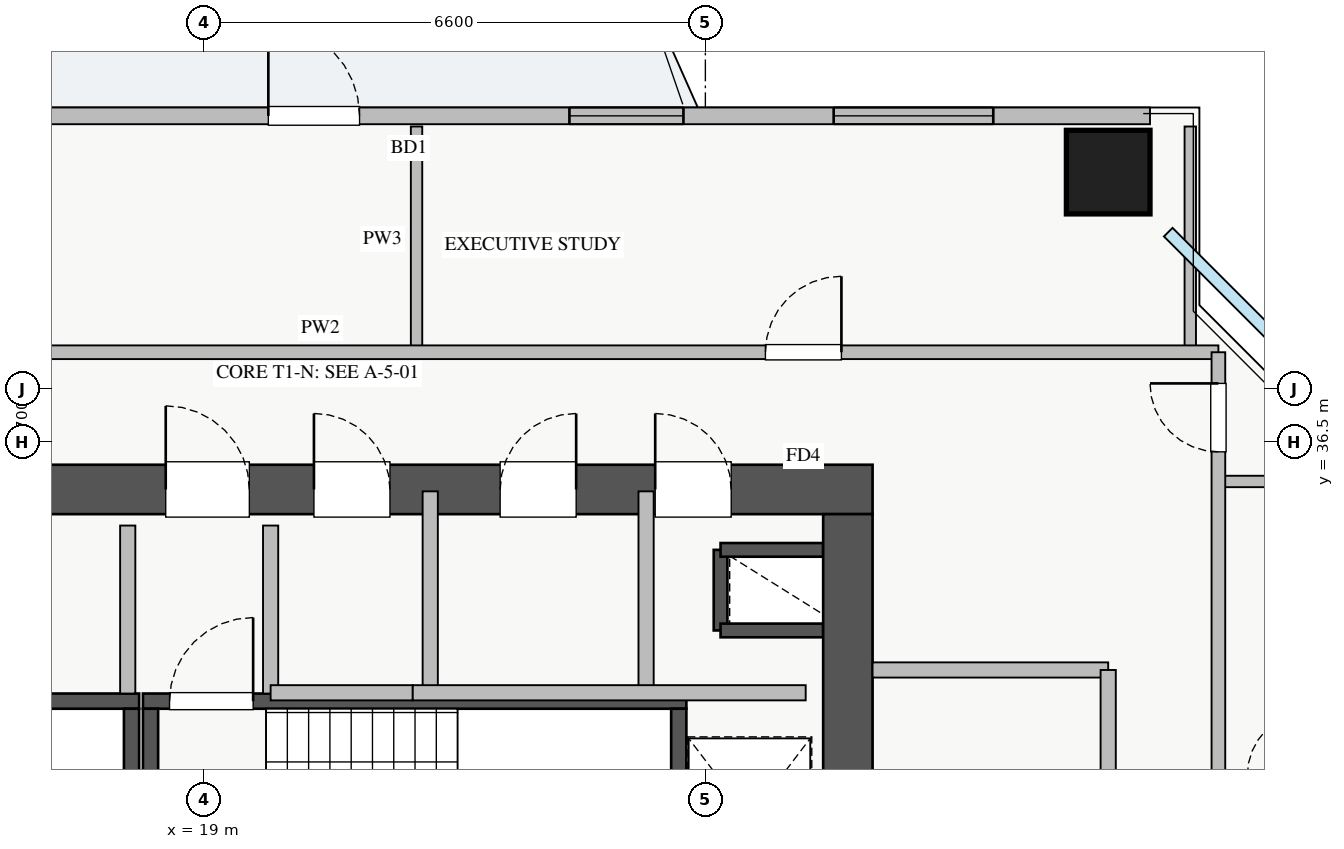
"""IFC4 building model, lengths in metres.
Left out: names, types, materials, properties, quantities, classifications, styles, units other than length and angle.
Written with IfcOpenShell. Run it as: python <this file> out.ifc"""

import sys

from ifc_helpers import new_model, si_unit, direction, frame, frame_2d, origin, origin_2d, place, context, subcontext, project, spatial, rectangle, extrude, source, transform, mapped, element, fill, save


model = new_model("IFC4")
c1 = context("Model", 3, precision=1e-05, world=origin(), true_north=direction((0.0, 1.0)))
c2 = subcontext(c1, "Body", "Model", "MODEL_VIEW")
j1 = project(units=[si_unit("LENGTHUNIT", "METRE"), si_unit("PLANEANGLEUNIT", "RADIAN")], contexts=[c1])
p1 = place(None, origin())
s1 = spatial("IfcSite", under=j1, at=p1, CompositionType="ELEMENT")
p2 = place(p1, origin())
s2 = spatial("IfcBuilding", under=s1, at=p2, CompositionType="ELEMENT")
p3 = place(p2, frame((0.0, 0.0, 129.5)))
s3 = spatial("IfcBuildingStorey", under=s2, at=p3, CompositionType="ELEMENT", Elevation=129.5)
p4 = place(p3, frame((25.8, 34.02, 0.0), z_axis=(0.0, 0.0, 1.0), x_axis=(0.0, 1.0, 0.0)))
e1 = element("IfcWall", 1, at=p4, inside=s3, PredefinedType="SHEAR", context=c2, shape_type="SweptSolid", body=[
    extrude(rectangle(XDim=1.06, YDim=0.18, at=frame_2d((0.53, 0.0))), origin(), (0.0, 0.0, 1.0), 3.07),
])
for number, where, z_axis, x_axis in (
    (2, (25.8, 35.08, 0.0), (0.0, 0.0, 1.0), (1.0, 0.0, 0.0)),
    (3, (25.8, 34.02, 0.0), (0.0, 0.0, 1.0), (1.0, 0.0, 0.0)),
):
    element("IfcWall", number, at=place(p3, frame(where, z_axis=z_axis, x_axis=x_axis)), inside=s3, PredefinedType="SHEAR", context=c2, shape_type="SweptSolid", body=[
        extrude(rectangle(XDim=1.35, YDim=0.18, at=frame_2d((0.675, 0.0))), origin(), (0.0, 0.0, 1.0), 3.07),
    ])
p5 = place(p3, frame((10.85, 33.09, 0.0), z_axis=(0.0, 0.0, 1.0), x_axis=(1.0, 0.0, 0.0)))
e4 = element("IfcWall", 4, at=p5, inside=s3, PredefinedType="SHEAR", context=c2, shape_type="SweptSolid", body=[
    extrude(rectangle(XDim=7.3, YDim=0.2, at=frame_2d((3.65, 0.0))), origin(), (0.0, 0.0, 1.0), 3.25),
])
p6 = place(p5, frame((0.35, 0.0, 0.0)))
e5 = element("IfcOpeningElement", 5, at=p6, cuts=e4, PredefinedType="OPENING", context=c2, shape_type="SweptSolid", body=[
    extrude(rectangle(XDim=1.1, YDim=2.05, at=frame_2d((0.55, 1.025))), frame((0.0, 0.11, 0.0), z_axis=(0.0, -1.0, 0.0), x_axis=(1.0, 0.0, 0.0)), (0.0, 0.0, 1.0), 0.22),
])
p7 = place(p3, frame((18.05, 30.05, 0.0), z_axis=(0.0, 0.0, 1.0), x_axis=(0.0, 1.0, 0.0)))
e6 = element("IfcWall", 6, at=p7, inside=s3, PredefinedType="SHEAR", context=c2, shape_type="SweptSolid", body=[
    extrude(rectangle(XDim=2.94, YDim=0.2, at=frame_2d((1.47, 0.0))), origin(), (0.0, 0.0, 1.0), 3.25),
])
p8 = place(p3, frame((18.2, 33.09, 0.0), z_axis=(0.0, 0.0, 1.0), x_axis=(1.0, 0.0, 0.0)))
e7 = element("IfcWall", 7, at=p8, inside=s3, PredefinedType="SHEAR", context=c2, shape_type="SweptSolid", body=[
    extrude(rectangle(XDim=7.15, YDim=0.2, at=frame_2d((3.575, 0.0))), origin(), (0.0, 0.0, 1.0), 3.25),
])
p9 = place(p8, frame((0.35, 0.0, 0.0)))
e8 = element("IfcOpeningElement", 8, at=p9, cuts=e7, PredefinedType="OPENING", context=c2, shape_type="SweptSolid", body=[
    extrude(rectangle(XDim=1.1, YDim=2.05, at=frame_2d((0.55, 1.025))), frame((0.0, 0.11, 0.0), z_axis=(0.0, -1.0, 0.0), x_axis=(1.0, 0.0, 0.0)), (0.0, 0.0, 1.0), 0.22),
])
for number, where, z_axis, x_axis in (
    (9, (18.3, 30.05, 0.0), (0.0, 0.0, 1.0), (0.0, 1.0, 0.0)),
    (10, (25.25, 30.05, 0.0), (0.0, 0.0, 1.0), (0.0, 1.0, 0.0)),
):
    element("IfcWall", number, at=place(p3, frame(where, z_axis=z_axis, x_axis=x_axis)), inside=s3, PredefinedType="SHEAR", context=c2, shape_type="SweptSolid", body=[
        extrude(rectangle(XDim=2.94, YDim=0.2, at=frame_2d((1.47, 0.0))), origin(), (0.0, 0.0, 1.0), 3.25),
    ])
p10 = place(p3, frame((10.2, 35.875, 0.0), z_axis=(0.0, 0.0, 1.0), x_axis=(1.0, 0.0, 0.0)))
e11 = element("IfcWall", 11, at=p10, inside=s3, PredefinedType="SHEAR", context=c2, shape_type="SweptSolid", body=[
    extrude(rectangle(XDim=17.6, YDim=0.65, at=frame_2d((8.8, 0.0))), origin(), (0.0, 0.0, 1.0), 3.25),
])
p11 = place(p10, frame((1.15, 0.0, 0.0)))
e12 = element("IfcOpeningElement", 12, at=p11, cuts=e11, PredefinedType="OPENING", context=c2, shape_type="SweptSolid", body=[
    extrude(rectangle(XDim=1.1, YDim=2.05, at=frame_2d((0.55, 1.025))), frame((0.0, 0.335, 0.0), z_axis=(0.0, -1.0, 0.0), x_axis=(1.0, 0.0, 0.0)), (0.0, 0.0, 1.0), 0.67),
])
p12 = place(p10, frame((8.3, 0.0, 0.0)))
e13 = element("IfcOpeningElement", 13, at=p12, cuts=e11, PredefinedType="OPENING", context=c2, shape_type="SweptSolid", body=[
    extrude(rectangle(XDim=1.1, YDim=2.05, at=frame_2d((0.55, 1.025))), frame((0.0, 0.335, 0.0), z_axis=(0.0, -1.0, 0.0), x_axis=(1.0, 0.0, 0.0)), (0.0, 0.0, 1.0), 0.67),
])
p13 = place(p10, frame((4.9, 0.0, 0.0)))
e14 = element("IfcOpeningElement", 14, at=p13, cuts=e11, PredefinedType="OPENING", context=c2, shape_type="SweptSolid", body=[
    extrude(rectangle(XDim=1.1, YDim=2.05, at=frame_2d((0.55, 1.025))), frame((0.0, 0.335, 0.0), z_axis=(0.0, -1.0, 0.0), x_axis=(1.0, 0.0, 0.0)), (0.0, 0.0, 1.0), 0.67),
])
p14 = place(p10, frame((14.74, 0.0, 0.0)))
e15 = element("IfcOpeningElement", 15, at=p14, cuts=e11, PredefinedType="OPENING", context=c2, shape_type="SweptSolid", body=[
    extrude(rectangle(XDim=1.0, YDim=2.05, at=frame_2d((0.5, 1.025))), frame((0.0, 0.335, 0.0), z_axis=(0.0, -1.0, 0.0), x_axis=(1.0, 0.0, 0.0)), (0.0, 0.0, 1.0), 0.67),
])
p15 = place(p10, frame((10.25, 0.0, 0.0)))
e16 = element("IfcOpeningElement", 16, at=p15, cuts=e11, PredefinedType="OPENING", context=c2, shape_type="SweptSolid", body=[
    extrude(rectangle(XDim=1.0, YDim=2.05, at=frame_2d((0.5, 1.025))), frame((0.0, 0.335, 0.0), z_axis=(0.0, -1.0, 0.0), x_axis=(1.0, 0.0, 0.0)), (0.0, 0.0, 1.0), 0.67),
])
p16 = place(p10, frame((12.7, 0.0, 0.0)))
e17 = element("IfcOpeningElement", 17, at=p16, cuts=e11, PredefinedType="OPENING", context=c2, shape_type="SweptSolid", body=[
    extrude(rectangle(XDim=1.0, YDim=2.05, at=frame_2d((0.5, 1.025))), frame((0.0, 0.335, 0.0), z_axis=(0.0, -1.0, 0.0), x_axis=(1.0, 0.0, 0.0)), (0.0, 0.0, 1.0), 0.67),
])
p17 = place(p3, frame((27.475, 29.65, 0.0), z_axis=(0.0, 0.0, 1.0), x_axis=(0.0, 1.0, 0.0)))
e18 = element("IfcWall", 18, at=p17, inside=s3, PredefinedType="SHEAR", context=c2, shape_type="SweptSolid", body=[
    extrude(rectangle(XDim=5.9, YDim=0.65, at=frame_2d((2.95, 0.0))), origin(), (0.0, 0.0, 1.0), 3.25),
])
p18 = place(p17, frame((1.1, 0.0, 0.0)))
e19 = element("IfcOpeningElement", 19, at=p18, cuts=e18, PredefinedType="OPENING", context=c2, shape_type="SweptSolid", body=[
    extrude(rectangle(XDim=1.3, YDim=2.05, at=frame_2d((0.65, 1.025))), frame((0.0, 0.335, 0.0), z_axis=(0.0, -1.0, 0.0), x_axis=(1.0, 0.0, 0.0)), (0.0, 0.0, 1.0), 0.67),
])
m1 = source(origin(), c2, "Body", "SweptSolid", [
    extrude(rectangle(XDim=1.1, YDim=1.1, at=origin_2d()), origin(), (0.0, 0.0, 1.0), 3.25),
])
p19 = place(p3, frame((30.9, 40.05, 0.0), z_axis=(0.0, 0.0, 1.0), x_axis=(1.0, 0.0, 0.0)))
e20 = element("IfcColumn", 20, at=p19, inside=s3, PredefinedType="COLUMN", context=c2, shape_type="MappedRepresentation", body=[
    mapped(m1, transform((0.0, 0.0, 0.0), x_axis=(1.0, 0.0, 0.0), y_axis=(0.0, 1.0, 0.0), z_axis=(0.0, 0.0, 1.0), scale=1.0)),
])
p20 = place(p3, frame((6.55, 40.79, 0.0), z_axis=(0.0, 0.0, 1.0), x_axis=(1.0, 0.0, 0.0)))
e21 = element("IfcWall", 21, at=p20, inside=s3, PredefinedType="STANDARD", context=c2, shape_type="SweptSolid", body=[
    extrude(rectangle(XDim=24.9, YDim=0.22, at=frame_2d((12.45, 0.0))), origin(), (0.0, 0.0, 1.0), 2.61),
])
p21 = place(p20, frame((13.3, 0.0, 0.0)))
e22 = element("IfcOpeningElement", 22, at=p21, cuts=e21, PredefinedType="OPENING", context=c2, shape_type="SweptSolid", body=[
    extrude(rectangle(XDim=1.2, YDim=2.1, at=frame_2d((0.6, 1.05))), frame((0.0, 0.12, 0.0), z_axis=(0.0, -1.0, 0.0), x_axis=(1.0, 0.0, 0.0)), (0.0, 0.0, 1.0), 0.24),
])
p22 = place(p20, frame((0.343, 0.0, 0.9)))
e23 = element("IfcOpeningElement", 23, at=p22, cuts=e21, PredefinedType="OPENING", context=c2, shape_type="SweptSolid", body=[
    extrude(rectangle(XDim=1.5, YDim=1.5, at=frame_2d((0.75, 0.75))), frame((0.0, 0.12, 0.0), z_axis=(0.0, -1.0, 0.0), x_axis=(1.0, 0.0, 0.0)), (0.0, 0.0, 1.0), 0.24),
])
p23 = place(p20, frame((8.438, 0.0, 0.9)))
e24 = element("IfcOpeningElement", 24, at=p23, cuts=e21, PredefinedType="OPENING", context=c2, shape_type="SweptSolid", body=[
    extrude(rectangle(XDim=1.8, YDim=1.45, at=frame_2d((0.9, 0.725))), frame((0.0, 0.12, 0.0), z_axis=(0.0, -1.0, 0.0), x_axis=(1.0, 0.0, 0.0)), (0.0, 0.0, 1.0), 0.24),
])
p24 = place(p20, frame((17.261, 0.0, 0.9)))
e25 = element("IfcOpeningElement", 25, at=p24, cuts=e21, PredefinedType="OPENING", context=c2, shape_type="SweptSolid", body=[
    extrude(rectangle(XDim=1.5, YDim=1.5, at=frame_2d((0.75, 0.75))), frame((0.0, 0.12, 0.0), z_axis=(0.0, -1.0, 0.0), x_axis=(1.0, 0.0, 0.0)), (0.0, 0.0, 1.0), 0.24),
])
p25 = place(p20, frame((20.738, 0.0, 0.9)))
e26 = element("IfcOpeningElement", 26, at=p25, cuts=e21, PredefinedType="OPENING", context=c2, shape_type="SweptSolid", body=[
    extrude(rectangle(XDim=2.1, YDim=1.48, at=frame_2d((1.05, 0.74))), frame((0.0, 0.12, 0.0), z_axis=(0.0, -1.0, 0.0), x_axis=(1.0, 0.0, 0.0)), (0.0, 0.0, 1.0), 0.24),
])
p26 = place(p20, frame((4.122, 0.0, 0.9)))
e27 = element("IfcOpeningElement", 27, at=p26, cuts=e21, PredefinedType="OPENING", context=c2, shape_type="SweptSolid", body=[
    extrude(rectangle(XDim=2.4, YDim=1.5, at=frame_2d((1.2, 0.75))), frame((0.0, 0.12, 0.0), z_axis=(0.0, -1.0, 0.0), x_axis=(1.0, 0.0, 0.0)), (0.0, 0.0, 1.0), 0.24),
])
p27 = place(p3, frame((27.8, 33.5, 0.0), z_axis=(0.0, 0.0, 1.0), x_axis=(1.0, 0.0, 0.0)))
e28 = element("IfcWall", 28, at=p27, inside=s3, PredefinedType="PARTITIONING", context=c2, shape_type="SweptSolid", body=[
    extrude(rectangle(XDim=3.1, YDim=0.2, at=frame_2d((1.55, 0.0))), origin(), (0.0, 0.0, 1.0), 3.07),
])
p28 = place(p3, frame((30.9, 29.6, 0.0), z_axis=(0.0, 0.0, 1.0), x_axis=(0.0, 1.0, 0.0)))
e29 = element("IfcWall", 29, at=p28, inside=s3, PredefinedType="PARTITIONING", context=c2, shape_type="SweptSolid", body=[
    extrude(rectangle(XDim=3.9, YDim=0.2, at=frame_2d((1.95, 0.0))), origin(), (0.0, 0.0, 1.0), 3.07),
])
p29 = place(p28, frame((1.4, 0.0, 0.0)))
e30 = element("IfcOpeningElement", 30, at=p29, cuts=e29, PredefinedType="OPENING", context=c2, shape_type="SweptSolid", body=[
    extrude(rectangle(XDim=1.1, YDim=2.05, at=frame_2d((0.55, 1.025))), frame((0.0, 0.11, 0.0), z_axis=(0.0, -1.0, 0.0), x_axis=(1.0, 0.0, 0.0)), (0.0, 0.0, 1.0), 0.22),
])
for number, where, z_axis, x_axis in (
    (31, (18.0, 33.19, 0.0), (0.0, 0.0, 1.0), (0.0, 1.0, 0.0)),
    (32, (19.88, 33.19, 0.0), (0.0, 0.0, 1.0), (0.0, 1.0, 0.0)),
):
    element("IfcWall", number, at=place(p3, frame(where, z_axis=z_axis, x_axis=x_axis)), inside=s3, PredefinedType="PARTITIONING", context=c2, shape_type="SweptSolid", body=[
        extrude(rectangle(XDim=2.21, YDim=0.2, at=frame_2d((1.105, 0.0))), origin(), (0.0, 0.0, 1.0), 3.07),
    ])
p30 = place(p3, frame((24.82, 33.2, 0.0), z_axis=(0.0, 0.0, 1.0), x_axis=(0.0, 1.0, 0.0)))
e33 = element("IfcWall", 33, at=p30, inside=s3, PredefinedType="PARTITIONING", context=c2, shape_type="SweptSolid", body=[
    extrude(rectangle(XDim=2.65, YDim=0.2, at=frame_2d((1.325, 0.0))), origin(), (0.0, 0.0, 1.0), 3.07),
])
p31 = place(p3, frame((19.88, 33.2, 0.0), z_axis=(0.0, 0.0, 1.0), x_axis=(1.0, 0.0, 0.0)))
e34 = element("IfcWall", 34, at=p31, inside=s3, PredefinedType="PARTITIONING", context=c2, shape_type="SweptSolid", body=[
    extrude(rectangle(XDim=1.87, YDim=0.2, at=frame_2d((0.935, 0.0))), origin(), (0.0, 0.0, 1.0), 3.07),
])
p32 = place(p3, frame((21.98, 33.2, 0.0), z_axis=(0.0, 0.0, 1.0), x_axis=(0.0, 1.0, 0.0)))
e35 = element("IfcWall", 35, at=p32, inside=s3, PredefinedType="PARTITIONING", context=c2, shape_type="SweptSolid", body=[
    extrude(rectangle(XDim=2.65, YDim=0.2, at=frame_2d((1.325, 0.0))), origin(), (0.0, 0.0, 1.0), 3.07),
])
p33 = place(p3, frame((21.75, 33.2, 0.0), z_axis=(0.0, 0.0, 1.0), x_axis=(1.0, 0.0, 0.0)))
e36 = element("IfcWall", 36, at=p33, inside=s3, PredefinedType="PARTITIONING", context=c2, shape_type="SweptSolid", body=[
    extrude(rectangle(XDim=5.17, YDim=0.2, at=frame_2d((2.585, 0.0))), origin(), (0.0, 0.0, 1.0), 3.07),
])
for number, where, z_axis, x_axis in (
    (37, (21.8, 37.68, 0.0), (0.0, 0.0, 1.0), (0.0, 1.0, 0.0)),
    (38, (31.98, 37.68, 0.0), (0.0, 0.0, 1.0), (0.0, 1.0, 0.0)),
):
    element("IfcWall", number, at=place(p3, frame(where, z_axis=z_axis, x_axis=x_axis)), inside=s3, PredefinedType="PARTITIONING", context=c2, shape_type="SweptSolid", body=[
        extrude(rectangle(XDim=2.97, YDim=0.15, at=frame_2d((1.485, 0.0))), origin(), (0.0, 0.0, 1.0), 3.07),
    ])
p34 = place(p3, frame((8.72, 37.68, 0.0), z_axis=(0.0, 0.0, 1.0), x_axis=(1.0, 0.0, 0.0)))
e39 = element("IfcWall", 39, at=p34, inside=s3, PredefinedType="PARTITIONING", context=c2, shape_type="SweptSolid", body=[
    extrude(rectangle(XDim=23.63, YDim=0.18, at=frame_2d((11.815, 0.0))), origin(), (0.0, 0.0, 1.0), 3.07),
])
p35 = place(p34, frame((6.04, 0.0, 0.0)))
e40 = element("IfcOpeningElement", 40, at=p35, cuts=e39, PredefinedType="OPENING", context=c2, shape_type="SweptSolid", body=[
    extrude(rectangle(XDim=1.0, YDim=2.05, at=frame_2d((0.5, 1.025))), frame((0.0, 0.1, 0.0), z_axis=(0.0, -1.0, 0.0), x_axis=(1.0, 0.0, 0.0)), (0.0, 0.0, 1.0), 0.2),
])
p36 = place(p34, frame((17.67, 0.0, 0.0)))
e41 = element("IfcOpeningElement", 41, at=p36, cuts=e39, PredefinedType="OPENING", context=c2, shape_type="SweptSolid", body=[
    extrude(rectangle(XDim=1.0, YDim=2.05, at=frame_2d((0.5, 1.025))), frame((0.0, 0.1, 0.0), z_axis=(0.0, -1.0, 0.0), x_axis=(1.0, 0.0, 0.0)), (0.0, 0.0, 1.0), 0.2),
])
p37 = place(p3, frame((32.35, 35.98, 0.0), z_axis=(0.0, 0.0, 1.0), x_axis=(1.0, 0.0, 0.0)))
e42 = element("IfcWall", 42, at=p37, inside=s3, PredefinedType="PARTITIONING", context=c2, shape_type="SweptSolid", body=[
    extrude(rectangle(XDim=4.3, YDim=0.15, at=frame_2d((2.15, 0.0))), origin(), (0.0, 0.0, 1.0), 3.07),
])
p38 = place(p3, frame((32.35, 8.31, 0.0), z_axis=(0.0, 0.0, 1.0), x_axis=(0.0, 1.0, 0.0)))
e43 = element("IfcWall", 43, at=p38, inside=s3, PredefinedType="PARTITIONING", context=c2, shape_type="SweptSolid", body=[
    extrude(rectangle(XDim=29.37, YDim=0.18, at=frame_2d((14.685, 0.0))), origin(), (0.0, 0.0, 1.0), 3.07),
])
p39 = place(p38, frame((28.06, 0.0, 0.0)))
e44 = element("IfcOpeningElement", 44, at=p39, cuts=e43, PredefinedType="OPENING", context=c2, shape_type="SweptSolid", body=[
    extrude(rectangle(XDim=0.9, YDim=2.05, at=frame_2d((0.45, 1.025))), frame((0.0, 0.1, 0.0), z_axis=(0.0, -1.0, 0.0), x_axis=(1.0, 0.0, 0.0)), (0.0, 0.0, 1.0), 0.2),
])
p40 = place(p38, frame((0.415, 0.0, 0.0)))
e45 = element("IfcOpeningElement", 45, at=p40, cuts=e43, PredefinedType="OPENING", context=c2, shape_type="SweptSolid", body=[
    extrude(rectangle(XDim=0.9, YDim=2.05, at=frame_2d((0.45, 1.025))), frame((0.0, 0.1, 0.0), z_axis=(0.0, -1.0, 0.0), x_axis=(1.0, 0.0, 0.0)), (0.0, 0.0, 1.0), 0.2),
])
p41 = place(p38, frame((5.295, 0.0, 0.0)))
e46 = element("IfcOpeningElement", 46, at=p41, cuts=e43, PredefinedType="OPENING", context=c2, shape_type="SweptSolid", body=[
    extrude(rectangle(XDim=1.0, YDim=2.05, at=frame_2d((0.5, 1.025))), frame((0.0, 0.1, 0.0), z_axis=(0.0, -1.0, 0.0), x_axis=(1.0, 0.0, 0.0)), (0.0, 0.0, 1.0), 0.2),
])
p42 = place(p38, frame((11.645, 0.0, 0.0)))
e47 = element("IfcOpeningElement", 47, at=p42, cuts=e43, PredefinedType="OPENING", context=c2, shape_type="SweptSolid", body=[
    extrude(rectangle(XDim=1.0, YDim=2.05, at=frame_2d((0.5, 1.025))), frame((0.0, 0.1, 0.0), z_axis=(0.0, -1.0, 0.0), x_axis=(1.0, 0.0, 0.0)), (0.0, 0.0, 1.0), 0.2),
])
p43 = place(p38, frame((20.835, 0.0, 0.0)))
e48 = element("IfcOpeningElement", 48, at=p43, cuts=e43, PredefinedType="OPENING", context=c2, shape_type="SweptSolid", body=[
    extrude(rectangle(XDim=1.0, YDim=2.05, at=frame_2d((0.5, 1.025))), frame((0.0, 0.1, 0.0), z_axis=(0.0, -1.0, 0.0), x_axis=(1.0, 0.0, 0.0)), (0.0, 0.0, 1.0), 0.2),
])
m2 = source(origin(), c2, "Body", "SweptSolid", [
    extrude(rectangle(XDim=1.2, YDim=2.1, at=frame_2d((0.6, 1.05))), frame((0.0, 0.025, 0.0), z_axis=(0.0, -1.0, 0.0), x_axis=(1.0, 0.0, 0.0)), (0.0, 0.0, 1.0), 0.05),
])
p44 = place(p21, origin())
e49 = element("IfcDoor", 49, at=p44, inside=s3, OperationType="SINGLE_SWING_LEFT", PredefinedType="DOOR", context=c2, shape_type="MappedRepresentation", body=[
    mapped(m2, transform((0.0, 0.0, 0.0), x_axis=(1.0, 0.0, 0.0), y_axis=(0.0, 1.0, 0.0), z_axis=(0.0, 0.0, 1.0), scale=1.0)),
])
fill(e22, e49)
m3 = source(origin(), c2, "Body", "SweptSolid", [
    extrude(rectangle(XDim=1.5, YDim=1.5, at=frame_2d((0.75, 0.75))), frame((0.0, 0.03, 0.0), z_axis=(0.0, -1.0, 0.0), x_axis=(1.0, 0.0, 0.0)), (0.0, 0.0, 1.0), 0.06),
])
p45 = place(p24, origin())
e50 = element("IfcWindow", 50, at=p45, inside=s3, PartitioningType="DOUBLE_PANEL_VERTICAL", PredefinedType="WINDOW", context=c2, shape_type="MappedRepresentation", body=[
    mapped(m3, transform((0.0, 0.0, 0.0), x_axis=(1.0, 0.0, 0.0), y_axis=(0.0, 1.0, 0.0), z_axis=(0.0, 0.0, 1.0), scale=1.0)),
])
fill(e25, e50)
m4 = source(origin(), c2, "Body", "SweptSolid", [
    extrude(rectangle(XDim=2.1, YDim=1.48, at=frame_2d((1.05, 0.74))), frame((0.0, 0.03, 0.0), z_axis=(0.0, -1.0, 0.0), x_axis=(1.0, 0.0, 0.0)), (0.0, 0.0, 1.0), 0.06),
])
p46 = place(p25, origin())
e51 = element("IfcWindow", 51, at=p46, inside=s3, PartitioningType="TRIPLE_PANEL_VERTICAL", PredefinedType="WINDOW", context=c2, shape_type="MappedRepresentation", body=[
    mapped(m4, transform((0.0, 0.0, 0.0), x_axis=(1.0, 0.0, 0.0), y_axis=(0.0, 1.0, 0.0), z_axis=(0.0, 0.0, 1.0), scale=1.0)),
])
fill(e26, e51)
m5 = source(origin(), c2, "Body", "SweptSolid", [
    extrude(rectangle(XDim=1.1, YDim=2.05, at=frame_2d((0.55, 1.025))), frame((0.0, 0.025, 0.0), z_axis=(0.0, -1.0, 0.0), x_axis=(1.0, 0.0, 0.0)), (0.0, 0.0, 1.0), 0.05),
])
p47 = place(p12, origin())
e52 = element("IfcDoor", 52, at=p47, inside=s3, OperationType="SINGLE_SWING_LEFT", PredefinedType="DOOR", context=c2, shape_type="MappedRepresentation", body=[
    mapped(m5, transform((0.0, 0.0, 0.0), x_axis=(1.0, 0.0, 0.0), y_axis=(0.0, 1.0, 0.0), z_axis=(0.0, 0.0, 1.0), scale=1.0)),
])
fill(e13, e52)
p48 = place(p9, origin())
e53 = element("IfcDoor", 53, at=p48, inside=s3, OperationType="SINGLE_SWING_RIGHT", PredefinedType="DOOR", context=c2, shape_type="MappedRepresentation", body=[
    mapped(m5, transform((0.0, 0.0, 0.0), x_axis=(1.0, 0.0, 0.0), y_axis=(0.0, 1.0, 0.0), z_axis=(0.0, 0.0, 1.0), scale=1.0)),
])
fill(e8, e53)
m6 = source(origin(), c2, "Body", "SweptSolid", [
    extrude(rectangle(XDim=1.0, YDim=2.05, at=frame_2d((0.5, 1.025))), frame((0.0, 0.025, 0.0), z_axis=(0.0, -1.0, 0.0), x_axis=(1.0, 0.0, 0.0)), (0.0, 0.0, 1.0), 0.05),
])
p49 = place(p14, origin())
e54 = element("IfcDoor", 54, at=p49, inside=s3, OperationType="SINGLE_SWING_LEFT", PredefinedType="DOOR", context=c2, shape_type="MappedRepresentation", body=[
    mapped(m6, transform((0.0, 0.0, 0.0), x_axis=(1.0, 0.0, 0.0), y_axis=(0.0, 1.0, 0.0), z_axis=(0.0, 0.0, 1.0), scale=1.0)),
])
fill(e15, e54)
p50 = place(p15, origin())
e55 = element("IfcDoor", 55, at=p50, inside=s3, OperationType="SINGLE_SWING_LEFT", PredefinedType="DOOR", context=c2, shape_type="MappedRepresentation", body=[
    mapped(m6, transform((0.0, 0.0, 0.0), x_axis=(1.0, 0.0, 0.0), y_axis=(0.0, 1.0, 0.0), z_axis=(0.0, 0.0, 1.0), scale=1.0)),
])
fill(e16, e55)
p51 = place(p16, origin())
e56 = element("IfcDoor", 56, at=p51, inside=s3, OperationType="SINGLE_SWING_RIGHT", PredefinedType="DOOR", context=c2, shape_type="MappedRepresentation", body=[
    mapped(m6, transform((0.0, 0.0, 0.0), x_axis=(1.0, 0.0, 0.0), y_axis=(0.0, 1.0, 0.0), z_axis=(0.0, 0.0, 1.0), scale=1.0)),
])
fill(e17, e56)
p52 = place(p36, origin())
e57 = element("IfcDoor", 57, at=p52, inside=s3, OperationType="SINGLE_SWING_RIGHT", PredefinedType="DOOR", context=c2, shape_type="MappedRepresentation", body=[
    mapped(m6, transform((0.0, 0.0, 0.0), x_axis=(1.0, 0.0, 0.0), y_axis=(0.0, 1.0, 0.0), z_axis=(0.0, 0.0, 1.0), scale=1.0)),
])
fill(e41, e57)
m7 = source(origin(), c2, "Body", "SweptSolid", [
    extrude(rectangle(XDim=0.9, YDim=2.05, at=frame_2d((0.45, 1.025))), frame((0.0, 0.025, 0.0), z_axis=(0.0, -1.0, 0.0), x_axis=(1.0, 0.0, 0.0)), (0.0, 0.0, 1.0), 0.05),
])
p53 = place(p39, origin())
e58 = element("IfcDoor", 58, at=p53, inside=s3, OperationType="SINGLE_SWING_RIGHT", PredefinedType="DOOR", context=c2, shape_type="MappedRepresentation", body=[
    mapped(m7, transform((0.0, 0.0, 0.0), x_axis=(1.0, 0.0, 0.0), y_axis=(0.0, 1.0, 0.0), z_axis=(0.0, 0.0, 1.0), scale=1.0)),
])
fill(e44, e58)
save(model, sys.argv[1])
